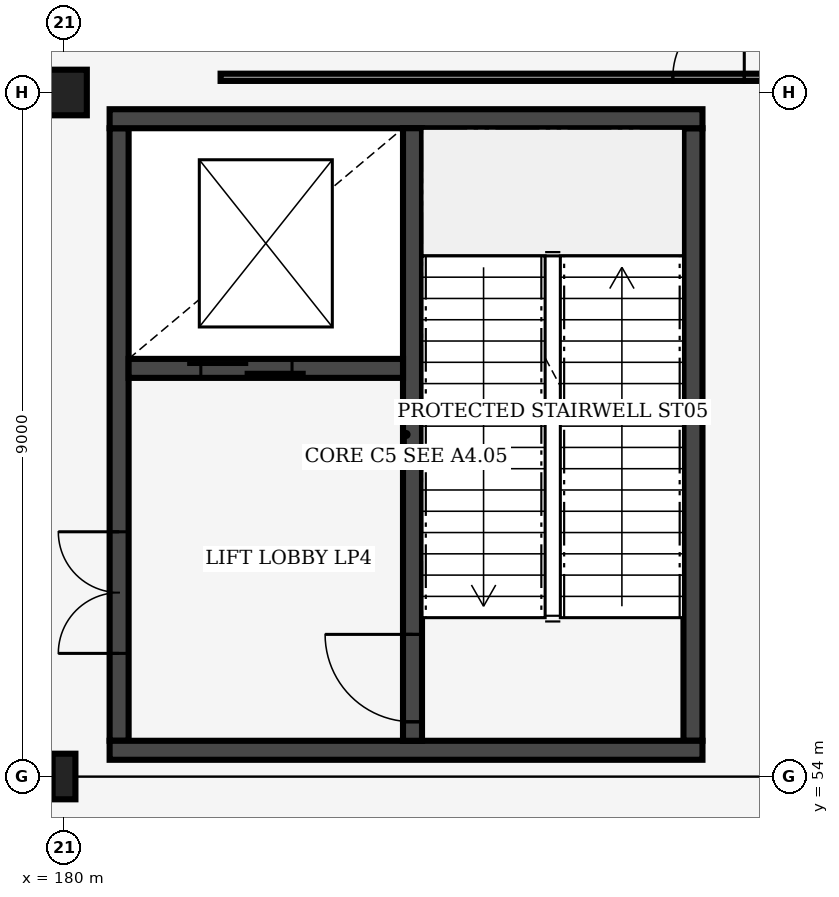
"""IFC4 building model, lengths in metres.
Left out: names, types, materials, properties, quantities, classifications, styles, units other than length and angle.
Written with IfcOpenShell. Run it as: python <this file> out.ifc"""

import sys

from ifc_helpers import new_model, si_unit, direction, frame, frame_2d, origin, origin_2d, place, context, subcontext, project, spatial, rectangle, i_section, extrude, element, fill, save


model = new_model("IFC4")
c1 = context("Model", 3, precision=1e-05, world=origin(), true_north=direction((0.0, 1.0)))
c2 = subcontext(c1, "Body", "Model", "MODEL_VIEW")
j1 = project(units=[si_unit("LENGTHUNIT", "METRE"), si_unit("PLANEANGLEUNIT", "RADIAN")], contexts=[c1])
p1 = place(None, origin())
s1 = spatial("IfcSite", under=j1, at=p1, CompositionType="ELEMENT")
p2 = place(p1, origin())
s2 = spatial("IfcBuilding", under=s1, at=p2, CompositionType="ELEMENT")
p3 = place(p2, frame((0.0, 0.0, 12.0)))
s3 = spatial("IfcBuildingStorey", under=s2, at=p3, CompositionType="ELEMENT", Elevation=12.0)
p4 = place(p3, frame((180.0, 54.0, 0.0), z_axis=(0.0, 0.0, 1.0), x_axis=(1.0, 0.0, 0.0)))
e1 = element("IfcColumn", 1, at=p4, inside=s3, PredefinedType="COLUMN", context=c2, shape_type="SweptSolid", body=[
    extrude(i_section(OverallWidth=0.3, OverallDepth=0.6, WebThickness=0.015, FlangeThickness=0.03, FilletRadius=0.027, at=origin_2d()), origin(), (0.0, 0.0, 1.0), 6.0),
])
p5 = place(p3, frame((180.0, 63.0, 0.0), z_axis=(0.0, 0.0, 1.0), x_axis=(1.0, 0.0, 0.0)))
e2 = element("IfcColumn", 2, at=p5, inside=s3, PredefinedType="COLUMN", context=c2, shape_type="SweptSolid", body=[
    extrude(rectangle(XDim=0.6, YDim=0.6, at=origin_2d()), origin(), (0.0, 0.0, 1.0), 6.0),
])
p6 = place(p3, frame((180.725, 54.47, 0.0), z_axis=(0.0, 0.0, 1.0), x_axis=(0.0, 1.0, 0.0)))
e3 = element("IfcWall", 3, at=p6, inside=s3, PredefinedType="SHEAR", context=c2, shape_type="SweptSolid", body=[
    extrude(rectangle(XDim=8.06, YDim=0.25, at=frame_2d((4.03, 0.0))), origin(), (0.0, 0.0, 1.0), 5.64),
])
p7 = place(p6, frame((1.15, 0.0, 0.0)))
e4 = element("IfcOpeningElement", 4, at=p7, cuts=e3, PredefinedType="OPENING", context=c2, shape_type="SweptSolid", body=[
    extrude(rectangle(XDim=1.6, YDim=2.2, at=frame_2d((0.8, 1.1))), frame((0.0, 0.135, 0.0), z_axis=(0.0, -1.0, 0.0), x_axis=(1.0, 0.0, 0.0)), (0.0, 0.0, 1.0), 0.27),
])
p8 = place(p3, frame((188.275, 54.47, 0.0), z_axis=(0.0, 0.0, 1.0), x_axis=(0.0, 1.0, 0.0)))
e5 = element("IfcWall", 5, at=p8, inside=s3, PredefinedType="SHEAR", context=c2, shape_type="SweptSolid", body=[
    extrude(rectangle(XDim=8.06, YDim=0.25, at=frame_2d((4.03, 0.0))), origin(), (0.0, 0.0, 1.0), 5.64),
])
for number, where, z_axis, x_axis in (
    (6, (180.6, 54.345, 0.0), (0.0, 0.0, 1.0), (1.0, 0.0, 0.0)),
    (7, (180.6, 62.655, 0.0), (0.0, 0.0, 1.0), (1.0, 0.0, 0.0)),
):
    element("IfcWall", number, at=place(p3, frame(where, z_axis=z_axis, x_axis=x_axis)), inside=s3, PredefinedType="SHEAR", context=c2, shape_type="SweptSolid", body=[
        extrude(rectangle(XDim=7.8, YDim=0.25, at=frame_2d((3.9, 0.0))), origin(), (0.0, 0.0, 1.0), 5.64),
    ])
p9 = place(p3, frame((184.585, 54.47, 0.0), z_axis=(0.0, 0.0, 1.0), x_axis=(0.0, 1.0, 0.0)))
e8 = element("IfcWall", 8, at=p9, inside=s3, PredefinedType="SHEAR", context=c2, shape_type="SweptSolid", body=[
    extrude(rectangle(XDim=8.06, YDim=0.25, at=frame_2d((4.03, 0.0))), origin(), (0.0, 0.0, 1.0), 5.64),
])
p10 = place(p9, frame((0.25, 0.0, 0.0)))
e9 = element("IfcOpeningElement", 9, at=p10, cuts=e8, PredefinedType="OPENING", context=c2, shape_type="SweptSolid", body=[
    extrude(rectangle(XDim=1.15, YDim=2.15, at=frame_2d((0.575, 1.075))), frame((0.0, 0.135, 0.0), z_axis=(0.0, -1.0, 0.0), x_axis=(1.0, 0.0, 0.0)), (0.0, 0.0, 1.0), 0.27),
])
p11 = place(p3, frame((180.85, 59.37, 0.0), z_axis=(0.0, 0.0, 1.0), x_axis=(1.0, 0.0, 0.0)))
e10 = element("IfcWall", 10, at=p11, inside=s3, PredefinedType="SHEAR", context=c2, shape_type="SweptSolid", body=[
    extrude(rectangle(XDim=3.61, YDim=0.25, at=frame_2d((1.805, 0.0))), origin(), (0.0, 0.0, 1.0), 5.64),
])
p12 = place(p11, frame((0.95, 0.0, 0.0)))
e11 = element("IfcOpeningElement", 11, at=p12, cuts=e10, PredefinedType="OPENING", context=c2, shape_type="SweptSolid", body=[
    extrude(rectangle(XDim=1.2, YDim=2.2, at=frame_2d((0.6, 1.1))), frame((0.0, 0.135, 0.0), z_axis=(0.0, -1.0, 0.0), x_axis=(1.0, 0.0, 0.0)), (0.0, 0.0, 1.0), 0.27),
])
p13 = place(p3, frame((182.06, 63.2, 0.0), z_axis=(0.0, 0.0, 1.0), x_axis=(1.0, 0.0, 0.0)))
e12 = element("IfcWall", 12, at=p13, inside=s3, PredefinedType="PARTITIONING", context=c2, shape_type="SweptSolid", body=[
    extrude(rectangle(XDim=9.04, YDim=0.095, at=frame_2d((4.52, 0.0))), origin(), (0.0, 0.0, 1.0), 4.75),
])
p14 = place(p13, frame((5.95, 0.0, 0.0)))
e13 = element("IfcOpeningElement", 13, at=p14, cuts=e12, PredefinedType="OPENING", context=c2, shape_type="SweptSolid", body=[
    extrude(rectangle(XDim=0.94, YDim=2.1, at=frame_2d((0.47, 1.05))), frame((0.0, 0.057, 0.0), z_axis=(0.0, -1.0, 0.0), x_axis=(1.0, 0.0, 0.0)), (0.0, 0.0, 1.0), 0.115),
])
p15 = place(p10, origin())
e14 = element("IfcDoor", 14, at=p15, inside=s3, OperationType="SINGLE_SWING_RIGHT", PredefinedType="DOOR", context=c2, shape_type="SweptSolid", body=[
    extrude(rectangle(XDim=1.15, YDim=2.15, at=frame_2d((0.575, 1.075))), frame((0.0, 0.025, 0.0), z_axis=(0.0, -1.0, 0.0), x_axis=(1.0, 0.0, 0.0)), (0.0, 0.0, 1.0), 0.05),
])
fill(e9, e14)
p16 = place(p12, origin())
e15 = element("IfcDoor", 15, at=p16, inside=s3, OperationType="DOUBLE_DOOR_SLIDING", PredefinedType="DOOR", context=c2, shape_type="SweptSolid", body=[
    extrude(rectangle(XDim=1.2, YDim=2.2, at=frame_2d((0.6, 1.1))), frame((0.0, 0.025, 0.0), z_axis=(0.0, -1.0, 0.0), x_axis=(1.0, 0.0, 0.0)), (0.0, 0.0, 1.0), 0.05),
])
fill(e11, e15)
p17 = place(p7, origin())
e16 = element("IfcDoor", 16, at=p17, inside=s3, OperationType="DOUBLE_DOOR_SINGLE_SWING", PredefinedType="DOOR", context=c2, shape_type="SweptSolid", body=[
    extrude(rectangle(XDim=1.6, YDim=2.2, at=frame_2d((0.8, 1.1))), frame((0.0, 0.025, 0.0), z_axis=(0.0, -1.0, 0.0), x_axis=(1.0, 0.0, 0.0)), (0.0, 0.0, 1.0), 0.05),
])
fill(e4, e16)
p18 = place(p14, origin())
e17 = element("IfcDoor", 17, at=p18, inside=s3, OperationType="SINGLE_SWING_RIGHT", PredefinedType="DOOR", context=c2, shape_type="SweptSolid", body=[
    extrude(rectangle(XDim=0.94, YDim=2.1, at=frame_2d((0.47, 1.05))), frame((0.0, 0.025, 0.0), z_axis=(0.0, -1.0, 0.0), x_axis=(1.0, 0.0, 0.0)), (0.0, 0.0, 1.0), 0.05),
])
fill(e13, e17)
save(model, sys.argv[1])
